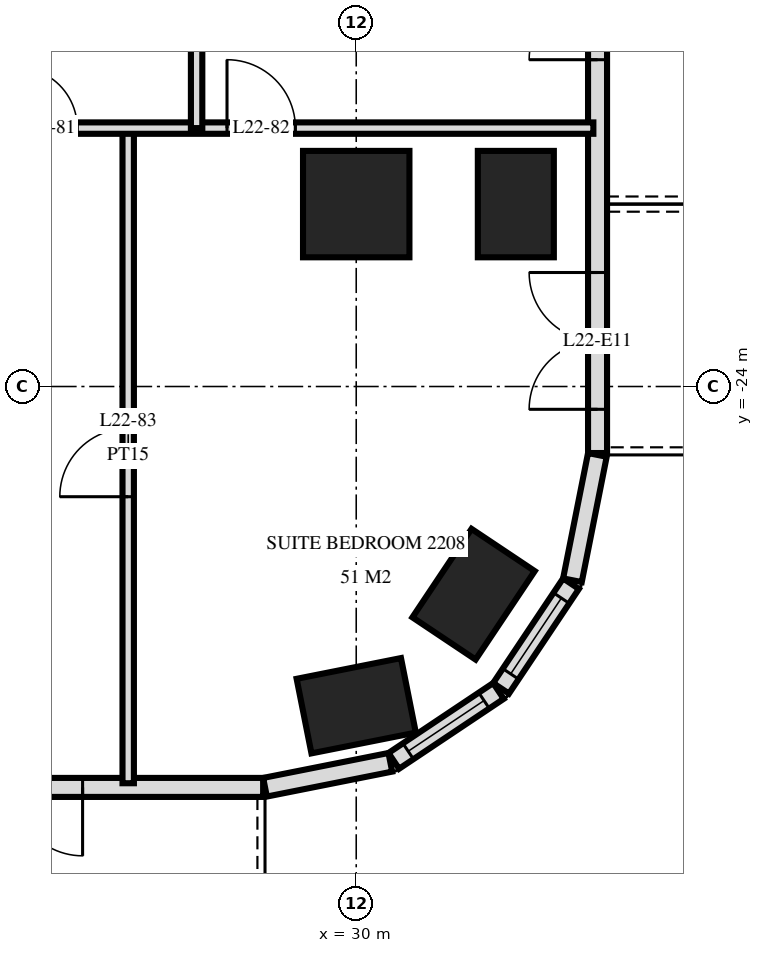
"""IFC4 building model, lengths in metres.
Left out: names, types, materials, properties, quantities, classifications, styles, units other than length and angle.
Written with IfcOpenShell. Run it as: python <this file> out.ifc"""

import sys

from ifc_helpers import new_model, si_unit, direction, frame, frame_2d, origin, origin_2d, place, context, subcontext, project, spatial, rectangle, extrude, element, fill, save


model = new_model("IFC4")
c1 = context("Model", 3, precision=1e-05, world=origin(), true_north=direction((0.0, 1.0)))
c2 = subcontext(c1, "Body", "Model", "MODEL_VIEW")
j1 = project(units=[si_unit("LENGTHUNIT", "METRE"), si_unit("PLANEANGLEUNIT", "RADIAN")], contexts=[c1])
p1 = place(None, origin())
s1 = spatial("IfcSite", under=j1, at=p1, CompositionType="ELEMENT")
p2 = place(p1, origin())
s2 = spatial("IfcBuilding", under=s1, at=p2, CompositionType="ELEMENT")
p3 = place(p2, frame((0.0, 0.0, 88.8)))
s3 = spatial("IfcBuildingStorey", under=s2, at=p3, CompositionType="ELEMENT", Elevation=88.8)
p4 = place(p3, frame((30.0, -28.2, 0.0), z_axis=(0.0, 0.0, 1.0), x_axis=(0.980792089743, 0.195056086032, 0.0)))
e1 = element("IfcColumn", 1, at=p4, inside=s3, PredefinedType="COLUMN", context=c2, shape_type="SweptSolid", body=[
    extrude(rectangle(XDim=1.4, YDim=1.0, at=origin_2d()), origin(), (0.0, 0.0, 1.0), 3.6),
])
p5 = place(p3, frame((30.0, -21.6, 0.0), z_axis=(0.0, 0.0, 1.0), x_axis=(1.0, 0.0, 0.0)))
e2 = element("IfcColumn", 2, at=p5, inside=s3, PredefinedType="COLUMN", context=c2, shape_type="SweptSolid", body=[
    extrude(rectangle(XDim=1.4, YDim=1.4, at=origin_2d()), origin(), (0.0, 0.0, 1.0), 3.6),
])
for number, where, z_axis, x_axis in (
    (3, (31.544, -26.733, 0.0), (0.0, 0.0, 1.0), (0.556, 0.831, 0.0)),
    (4, (32.1, -21.6, 0.0), (0.0, 0.0, 1.0), (0.0, 1.0, 0.0)),
):
    element("IfcColumn", number, at=place(p3, frame(where, z_axis=z_axis, x_axis=x_axis)), inside=s3, PredefinedType="COLUMN", context=c2, shape_type="SweptSolid", body=[
        extrude(rectangle(XDim=1.4, YDim=1.0, at=origin_2d()), origin(), (0.0, 0.0, 1.0), 3.6),
    ])
p6 = place(p3, frame((-28.775, -29.275, 0.0), z_axis=(0.0, 0.0, 1.0), x_axis=(1.0, 0.0, 0.0)))
e5 = element("IfcWall", 5, at=p6, inside=s3, PredefinedType="SOLIDWALL", context=c2, shape_type="SweptSolid", body=[
    extrude(rectangle(XDim=57.551, YDim=0.25, at=frame_2d((28.775, 0.0))), origin(), (0.0, 0.0, 1.0), 3.32),
])
p7 = place(p6, frame((0.575, 0.0, 0.0)))
e6 = element("IfcOpeningElement", 6, at=p7, cuts=e5, PredefinedType="OPENING", context=c2, shape_type="SweptSolid", body=[
    extrude(rectangle(XDim=1.8, YDim=2.4, at=frame_2d((0.9, 1.2))), frame((0.0, 0.135, 0.0), z_axis=(0.0, -1.0, 0.0), x_axis=(1.0, 0.0, 0.0)), (0.0, 0.0, 1.0), 0.27),
])
p8 = place(p6, frame((5.075, 0.0, 0.3)))
e7 = element("IfcOpeningElement", 7, at=p8, cuts=e5, PredefinedType="OPENING", context=c2, shape_type="SweptSolid", body=[
    extrude(rectangle(XDim=2.4, YDim=2.1, at=frame_2d((1.2, 1.05))), frame((0.0, 0.135, 0.0), z_axis=(0.0, -1.0, 0.0), x_axis=(1.0, 0.0, 0.0)), (0.0, 0.0, 1.0), 0.27),
])
p9 = place(p6, frame((8.375, 0.0, 0.0)))
e8 = element("IfcOpeningElement", 8, at=p9, cuts=e5, PredefinedType="OPENING", context=c2, shape_type="SweptSolid", body=[
    extrude(rectangle(XDim=1.8, YDim=2.4, at=frame_2d((0.9, 1.2))), frame((0.0, 0.135, 0.0), z_axis=(0.0, -1.0, 0.0), x_axis=(1.0, 0.0, 0.0)), (0.0, 0.0, 1.0), 0.27),
])
p10 = place(p6, frame((11.375, 0.0, 0.0)))
e9 = element("IfcOpeningElement", 9, at=p10, cuts=e5, PredefinedType="OPENING", context=c2, shape_type="SweptSolid", body=[
    extrude(rectangle(XDim=1.8, YDim=2.4, at=frame_2d((0.9, 1.2))), frame((0.0, 0.135, 0.0), z_axis=(0.0, -1.0, 0.0), x_axis=(1.0, 0.0, 0.0)), (0.0, 0.0, 1.0), 0.27),
])
p11 = place(p6, frame((14.075, 0.0, 0.3)))
e10 = element("IfcOpeningElement", 10, at=p11, cuts=e5, PredefinedType="OPENING", context=c2, shape_type="SweptSolid", body=[
    extrude(rectangle(XDim=2.4, YDim=2.1, at=frame_2d((1.2, 1.05))), frame((0.0, 0.135, 0.0), z_axis=(0.0, -1.0, 0.0), x_axis=(1.0, 0.0, 0.0)), (0.0, 0.0, 1.0), 0.27),
])
p12 = place(p6, frame((17.375, 0.0, 0.0)))
e11 = element("IfcOpeningElement", 11, at=p12, cuts=e5, PredefinedType="OPENING", context=c2, shape_type="SweptSolid", body=[
    extrude(rectangle(XDim=1.8, YDim=2.4, at=frame_2d((0.9, 1.2))), frame((0.0, 0.135, 0.0), z_axis=(0.0, -1.0, 0.0), x_axis=(1.0, 0.0, 0.0)), (0.0, 0.0, 1.0), 0.27),
])
p13 = place(p6, frame((20.075, 0.0, 0.3)))
e12 = element("IfcOpeningElement", 12, at=p13, cuts=e5, PredefinedType="OPENING", context=c2, shape_type="SweptSolid", body=[
    extrude(rectangle(XDim=2.4, YDim=2.1, at=frame_2d((1.2, 1.05))), frame((0.0, 0.135, 0.0), z_axis=(0.0, -1.0, 0.0), x_axis=(1.0, 0.0, 0.0)), (0.0, 0.0, 1.0), 0.27),
])
p14 = place(p6, frame((23.075, 0.0, 0.3)))
e13 = element("IfcOpeningElement", 13, at=p14, cuts=e5, PredefinedType="OPENING", context=c2, shape_type="SweptSolid", body=[
    extrude(rectangle(XDim=2.4, YDim=2.1, at=frame_2d((1.2, 1.05))), frame((0.0, 0.135, 0.0), z_axis=(0.0, -1.0, 0.0), x_axis=(1.0, 0.0, 0.0)), (0.0, 0.0, 1.0), 0.27),
])
p15 = place(p6, frame((26.375, 0.0, 0.0)))
e14 = element("IfcOpeningElement", 14, at=p15, cuts=e5, PredefinedType="OPENING", context=c2, shape_type="SweptSolid", body=[
    extrude(rectangle(XDim=1.8, YDim=2.4, at=frame_2d((0.9, 1.2))), frame((0.0, 0.135, 0.0), z_axis=(0.0, -1.0, 0.0), x_axis=(1.0, 0.0, 0.0)), (0.0, 0.0, 1.0), 0.27),
])
p16 = place(p6, frame((29.375, 0.0, 0.0)))
e15 = element("IfcOpeningElement", 15, at=p16, cuts=e5, PredefinedType="OPENING", context=c2, shape_type="SweptSolid", body=[
    extrude(rectangle(XDim=1.8, YDim=2.4, at=frame_2d((0.9, 1.2))), frame((0.0, 0.135, 0.0), z_axis=(0.0, -1.0, 0.0), x_axis=(1.0, 0.0, 0.0)), (0.0, 0.0, 1.0), 0.27),
])
p17 = place(p6, frame((32.075, 0.0, 0.3)))
e16 = element("IfcOpeningElement", 16, at=p17, cuts=e5, PredefinedType="OPENING", context=c2, shape_type="SweptSolid", body=[
    extrude(rectangle(XDim=2.4, YDim=2.1, at=frame_2d((1.2, 1.05))), frame((0.0, 0.135, 0.0), z_axis=(0.0, -1.0, 0.0), x_axis=(1.0, 0.0, 0.0)), (0.0, 0.0, 1.0), 0.27),
])
p18 = place(p6, frame((35.375, 0.0, 0.0)))
e17 = element("IfcOpeningElement", 17, at=p18, cuts=e5, PredefinedType="OPENING", context=c2, shape_type="SweptSolid", body=[
    extrude(rectangle(XDim=1.8, YDim=2.4, at=frame_2d((0.9, 1.2))), frame((0.0, 0.135, 0.0), z_axis=(0.0, -1.0, 0.0), x_axis=(1.0, 0.0, 0.0)), (0.0, 0.0, 1.0), 0.27),
])
p19 = place(p6, frame((38.075, 0.0, 0.3)))
e18 = element("IfcOpeningElement", 18, at=p19, cuts=e5, PredefinedType="OPENING", context=c2, shape_type="SweptSolid", body=[
    extrude(rectangle(XDim=2.4, YDim=2.1, at=frame_2d((1.2, 1.05))), frame((0.0, 0.135, 0.0), z_axis=(0.0, -1.0, 0.0), x_axis=(1.0, 0.0, 0.0)), (0.0, 0.0, 1.0), 0.27),
])
p20 = place(p6, frame((41.075, 0.0, 0.3)))
e19 = element("IfcOpeningElement", 19, at=p20, cuts=e5, PredefinedType="OPENING", context=c2, shape_type="SweptSolid", body=[
    extrude(rectangle(XDim=2.4, YDim=2.1, at=frame_2d((1.2, 1.05))), frame((0.0, 0.135, 0.0), z_axis=(0.0, -1.0, 0.0), x_axis=(1.0, 0.0, 0.0)), (0.0, 0.0, 1.0), 0.27),
])
p21 = place(p6, frame((44.375, 0.0, 0.0)))
e20 = element("IfcOpeningElement", 20, at=p21, cuts=e5, PredefinedType="OPENING", context=c2, shape_type="SweptSolid", body=[
    extrude(rectangle(XDim=1.8, YDim=2.4, at=frame_2d((0.9, 1.2))), frame((0.0, 0.135, 0.0), z_axis=(0.0, -1.0, 0.0), x_axis=(1.0, 0.0, 0.0)), (0.0, 0.0, 1.0), 0.27),
])
p22 = place(p6, frame((47.075, 0.0, 0.3)))
e21 = element("IfcOpeningElement", 21, at=p22, cuts=e5, PredefinedType="OPENING", context=c2, shape_type="SweptSolid", body=[
    extrude(rectangle(XDim=2.4, YDim=2.1, at=frame_2d((1.2, 1.05))), frame((0.0, 0.135, 0.0), z_axis=(0.0, -1.0, 0.0), x_axis=(1.0, 0.0, 0.0)), (0.0, 0.0, 1.0), 0.27),
])
p23 = place(p6, frame((50.375, 0.0, 0.0)))
e22 = element("IfcOpeningElement", 22, at=p23, cuts=e5, PredefinedType="OPENING", context=c2, shape_type="SweptSolid", body=[
    extrude(rectangle(XDim=1.8, YDim=2.4, at=frame_2d((0.9, 1.2))), frame((0.0, 0.135, 0.0), z_axis=(0.0, -1.0, 0.0), x_axis=(1.0, 0.0, 0.0)), (0.0, 0.0, 1.0), 0.27),
])
p24 = place(p6, frame((53.375, 0.0, 0.0)))
e23 = element("IfcOpeningElement", 23, at=p24, cuts=e5, PredefinedType="OPENING", context=c2, shape_type="SweptSolid", body=[
    extrude(rectangle(XDim=1.8, YDim=2.4, at=frame_2d((0.9, 1.2))), frame((0.0, 0.135, 0.0), z_axis=(0.0, -1.0, 0.0), x_axis=(1.0, 0.0, 0.0)), (0.0, 0.0, 1.0), 0.27),
])
p25 = place(p3, frame((28.8, -29.273, 0.0), z_axis=(0.0, 0.0, 1.0), x_axis=(0.980775640221, 0.19513878023, 0.0)))
e24 = element("IfcWall", 24, at=p25, inside=s3, PredefinedType="SOLIDWALL", context=c2, shape_type="SweptSolid", body=[
    extrude(rectangle(XDim=1.681, YDim=0.25, at=frame_2d((0.841, 0.0))), origin(), (0.0, 0.0, 1.0), 3.32),
])
p26 = place(p3, frame((30.494, -28.926, 0.0), z_axis=(0.0, 0.0, 1.0), x_axis=(0.831482937015, 0.55555029066, 0.0)))
e25 = element("IfcWall", 25, at=p26, inside=s3, PredefinedType="SOLIDWALL", context=c2, shape_type="SweptSolid", body=[
    extrude(rectangle(XDim=1.656, YDim=0.25, at=frame_2d((0.828, 0.0))), origin(), (0.0, 0.0, 1.0), 3.32),
])
p27 = place(p26, frame((0.228, 0.0, 0.9)))
e26 = element("IfcOpeningElement", 26, at=p27, cuts=e25, PredefinedType="OPENING", context=c2, shape_type="SweptSolid", body=[
    extrude(rectangle(XDim=1.2, YDim=1.5, at=frame_2d((0.6, 0.75))), frame((0.0, 0.135, 0.0), z_axis=(0.0, -1.0, 0.0), x_axis=(1.0, 0.0, 0.0)), (0.0, 0.0, 1.0), 0.27),
])
p28 = place(p3, frame((31.906, -27.971, 0.0), z_axis=(0.0, 0.0, 1.0), x_axis=(0.55555029066, 0.831482937015, 0.0)))
e27 = element("IfcWall", 27, at=p28, inside=s3, PredefinedType="SOLIDWALL", context=c2, shape_type="SweptSolid", body=[
    extrude(rectangle(XDim=1.656, YDim=0.25, at=frame_2d((0.828, 0.0))), origin(), (0.0, 0.0, 1.0), 3.32),
])
p29 = place(p28, frame((0.228, 0.0, 0.9)))
e28 = element("IfcOpeningElement", 28, at=p29, cuts=e27, PredefinedType="OPENING", context=c2, shape_type="SweptSolid", body=[
    extrude(rectangle(XDim=1.2, YDim=1.5, at=frame_2d((0.6, 0.75))), frame((0.0, 0.135, 0.0), z_axis=(0.0, -1.0, 0.0), x_axis=(1.0, 0.0, 0.0)), (0.0, 0.0, 1.0), 0.27),
])
p30 = place(p3, frame((32.844, -26.549, 0.0), z_axis=(0.0, 0.0, 1.0), x_axis=(0.195166572128, 0.980770110232, 0.0)))
e29 = element("IfcWall", 29, at=p30, inside=s3, PredefinedType="SOLIDWALL", context=c2, shape_type="SweptSolid", body=[
    extrude(rectangle(XDim=1.681, YDim=0.25, at=frame_2d((0.841, 0.0))), origin(), (0.0, 0.0, 1.0), 3.32),
])
p31 = place(p3, frame((33.175, -24.875, 0.0), z_axis=(0.0, 0.0, 1.0), x_axis=(0.0, 1.0, 0.0)))
e30 = element("IfcWall", 30, at=p31, inside=s3, PredefinedType="SOLIDWALL", context=c2, shape_type="SweptSolid", body=[
    extrude(rectangle(XDim=21.551, YDim=0.25, at=frame_2d((10.775, 0.0))), origin(), (0.0, 0.0, 1.0), 3.32),
])
p32 = place(p31, frame((0.575, 0.0, 0.0)))
e31 = element("IfcOpeningElement", 31, at=p32, cuts=e30, PredefinedType="OPENING", context=c2, shape_type="SweptSolid", body=[
    extrude(rectangle(XDim=1.8, YDim=2.4, at=frame_2d((0.9, 1.2))), frame((0.0, 0.135, 0.0), z_axis=(0.0, -1.0, 0.0), x_axis=(1.0, 0.0, 0.0)), (0.0, 0.0, 1.0), 0.27),
])
p33 = place(p31, frame((5.175, 0.0, 0.0)))
e32 = element("IfcOpeningElement", 32, at=p33, cuts=e30, PredefinedType="OPENING", context=c2, shape_type="SweptSolid", body=[
    extrude(rectangle(XDim=1.8, YDim=2.4, at=frame_2d((0.9, 1.2))), frame((0.0, 0.135, 0.0), z_axis=(0.0, -1.0, 0.0), x_axis=(1.0, 0.0, 0.0)), (0.0, 0.0, 1.0), 0.27),
])
p34 = place(p31, frame((8.275, 0.0, 0.3)))
e33 = element("IfcOpeningElement", 33, at=p34, cuts=e30, PredefinedType="OPENING", context=c2, shape_type="SweptSolid", body=[
    extrude(rectangle(XDim=1.2, YDim=2.1, at=frame_2d((0.6, 1.05))), frame((0.0, 0.135, 0.0), z_axis=(0.0, -1.0, 0.0), x_axis=(1.0, 0.0, 0.0)), (0.0, 0.0, 1.0), 0.27),
])
p35 = place(p31, frame((12.725, 0.0, 0.0)))
e34 = element("IfcOpeningElement", 34, at=p35, cuts=e30, PredefinedType="OPENING", context=c2, shape_type="SweptSolid", body=[
    extrude(rectangle(XDim=1.8, YDim=2.4, at=frame_2d((0.9, 1.2))), frame((0.0, 0.135, 0.0), z_axis=(0.0, -1.0, 0.0), x_axis=(1.0, 0.0, 0.0)), (0.0, 0.0, 1.0), 0.27),
])
p36 = place(p3, frame((27.9, -20.6, 0.0), z_axis=(0.0, 0.0, 1.0), x_axis=(0.0, 1.0, 0.0)))
e35 = element("IfcWall", 35, at=p36, inside=s3, PredefinedType="PARTITIONING", context=c2, shape_type="SweptSolid", body=[
    extrude(rectangle(XDim=3.6, YDim=0.15, at=frame_2d((1.8, 0.0))), origin(), (0.0, 0.0, 1.0), 3.32),
])
p37 = place(p3, frame((27.0, -29.22, 0.0), z_axis=(0.0, 0.0, 1.0), x_axis=(0.0, 1.0, 0.0)))
e36 = element("IfcWall", 36, at=p37, inside=s3, PredefinedType="PARTITIONING", context=c2, shape_type="SweptSolid", body=[
    extrude(rectangle(XDim=8.62, YDim=0.15, at=frame_2d((4.31, 0.0))), origin(), (0.0, 0.0, 1.0), 3.32),
])
p38 = place(p37, frame((3.77, 0.0, 0.0)))
e37 = element("IfcOpeningElement", 37, at=p38, cuts=e36, PredefinedType="OPENING", context=c2, shape_type="SweptSolid", body=[
    extrude(rectangle(XDim=0.9, YDim=2.1, at=frame_2d((0.45, 1.05))), frame((0.0, 0.085, 0.0), z_axis=(0.0, -1.0, 0.0), x_axis=(1.0, 0.0, 0.0)), (0.0, 0.0, 1.0), 0.17),
])
p39 = place(p3, frame((24.9, -20.6, 0.0), z_axis=(0.0, 0.0, 1.0), x_axis=(1.0, 0.0, 0.0)))
e38 = element("IfcWall", 38, at=p39, inside=s3, PredefinedType="PARTITIONING", context=c2, shape_type="SweptSolid", body=[
    extrude(rectangle(XDim=8.22, YDim=0.15, at=frame_2d((4.11, 0.0))), origin(), (0.0, 0.0, 1.0), 3.32),
])
p40 = place(p39, frame((0.63, 0.0, 0.0)))
e39 = element("IfcOpeningElement", 39, at=p40, cuts=e38, PredefinedType="OPENING", context=c2, shape_type="SweptSolid", body=[
    extrude(rectangle(XDim=0.8, YDim=2.1, at=frame_2d((0.4, 1.05))), frame((0.0, 0.085, 0.0), z_axis=(0.0, -1.0, 0.0), x_axis=(1.0, 0.0, 0.0)), (0.0, 0.0, 1.0), 0.17),
])
p41 = place(p39, frame((3.4, 0.0, 0.0)))
e40 = element("IfcOpeningElement", 40, at=p41, cuts=e38, PredefinedType="OPENING", context=c2, shape_type="SweptSolid", body=[
    extrude(rectangle(XDim=0.9, YDim=2.1, at=frame_2d((0.45, 1.05))), frame((0.0, 0.085, 0.0), z_axis=(0.0, -1.0, 0.0), x_axis=(1.0, 0.0, 0.0)), (0.0, 0.0, 1.0), 0.17),
])
p42 = place(p27, origin())
e41 = element("IfcWindow", 41, at=p42, inside=s3, PartitioningType="SINGLE_PANEL", PredefinedType="WINDOW", context=c2, shape_type="SweptSolid", body=[
    extrude(rectangle(XDim=1.2, YDim=1.5, at=frame_2d((0.6, 0.75))), frame((0.0, 0.03, 0.0), z_axis=(0.0, -1.0, 0.0), x_axis=(1.0, 0.0, 0.0)), (0.0, 0.0, 1.0), 0.06),
])
fill(e26, e41)
p43 = place(p29, origin())
e42 = element("IfcWindow", 42, at=p43, inside=s3, PartitioningType="SINGLE_PANEL", PredefinedType="WINDOW", context=c2, shape_type="SweptSolid", body=[
    extrude(rectangle(XDim=1.2, YDim=1.5, at=frame_2d((0.6, 0.75))), frame((0.0, 0.03, 0.0), z_axis=(0.0, -1.0, 0.0), x_axis=(1.0, 0.0, 0.0)), (0.0, 0.0, 1.0), 0.06),
])
fill(e28, e42)
p44 = place(p24, frame((0.9, 0.0, 0.0), z_axis=(0.0, 0.0, 1.0), x_axis=(-1.0, 0.0, 0.0)))
e43 = element("IfcDoor", 43, at=p44, inside=s3, OperationType="DOUBLE_DOOR_SINGLE_SWING", PredefinedType="DOOR", context=c2, shape_type="SweptSolid", body=[
    extrude(rectangle(XDim=1.8, YDim=2.4, at=frame_2d((0.0, 1.2))), frame((0.0, -0.025, 0.0), z_axis=(0.0, 1.0, 0.0), x_axis=(-1.0, 0.0, 0.0)), (0.0, 0.0, 1.0), 0.05),
])
fill(e23, e43)
p45 = place(p32, origin())
e44 = element("IfcDoor", 44, at=p45, inside=s3, OperationType="DOUBLE_DOOR_SINGLE_SWING", PredefinedType="DOOR", context=c2, shape_type="SweptSolid", body=[
    extrude(rectangle(XDim=1.8, YDim=2.4, at=frame_2d((0.9, 1.2))), frame((0.0, 0.025, 0.0), z_axis=(0.0, -1.0, 0.0), x_axis=(1.0, 0.0, 0.0)), (0.0, 0.0, 1.0), 0.05),
])
fill(e31, e44)
p46 = place(p33, origin())
e45 = element("IfcDoor", 45, at=p46, inside=s3, OperationType="DOUBLE_DOOR_SINGLE_SWING", PredefinedType="DOOR", context=c2, shape_type="SweptSolid", body=[
    extrude(rectangle(XDim=1.8, YDim=2.4, at=frame_2d((0.9, 1.2))), frame((0.0, 0.025, 0.0), z_axis=(0.0, -1.0, 0.0), x_axis=(1.0, 0.0, 0.0)), (0.0, 0.0, 1.0), 0.05),
])
fill(e32, e45)
p47 = place(p40, origin())
e46 = element("IfcDoor", 46, at=p47, inside=s3, OperationType="SINGLE_SWING_RIGHT", PredefinedType="DOOR", context=c2, shape_type="SweptSolid", body=[
    extrude(rectangle(XDim=0.8, YDim=2.1, at=frame_2d((0.4, 1.05))), frame((0.0, 0.025, 0.0), z_axis=(0.0, -1.0, 0.0), x_axis=(1.0, 0.0, 0.0)), (0.0, 0.0, 1.0), 0.05),
])
fill(e39, e46)
p48 = place(p41, origin())
e47 = element("IfcDoor", 47, at=p48, inside=s3, OperationType="SINGLE_SWING_RIGHT", PredefinedType="DOOR", context=c2, shape_type="SweptSolid", body=[
    extrude(rectangle(XDim=0.9, YDim=2.1, at=frame_2d((0.45, 1.05))), frame((0.0, 0.025, 0.0), z_axis=(0.0, -1.0, 0.0), x_axis=(1.0, 0.0, 0.0)), (0.0, 0.0, 1.0), 0.05),
])
fill(e40, e47)
p49 = place(p38, origin())
e48 = element("IfcDoor", 48, at=p49, inside=s3, OperationType="SINGLE_SWING_RIGHT", PredefinedType="DOOR", context=c2, shape_type="SweptSolid", body=[
    extrude(rectangle(XDim=0.9, YDim=2.1, at=frame_2d((0.45, 1.05))), frame((0.0, 0.025, 0.0), z_axis=(0.0, -1.0, 0.0), x_axis=(1.0, 0.0, 0.0)), (0.0, 0.0, 1.0), 0.05),
])
fill(e37, e48)
save(model, sys.argv[1])
